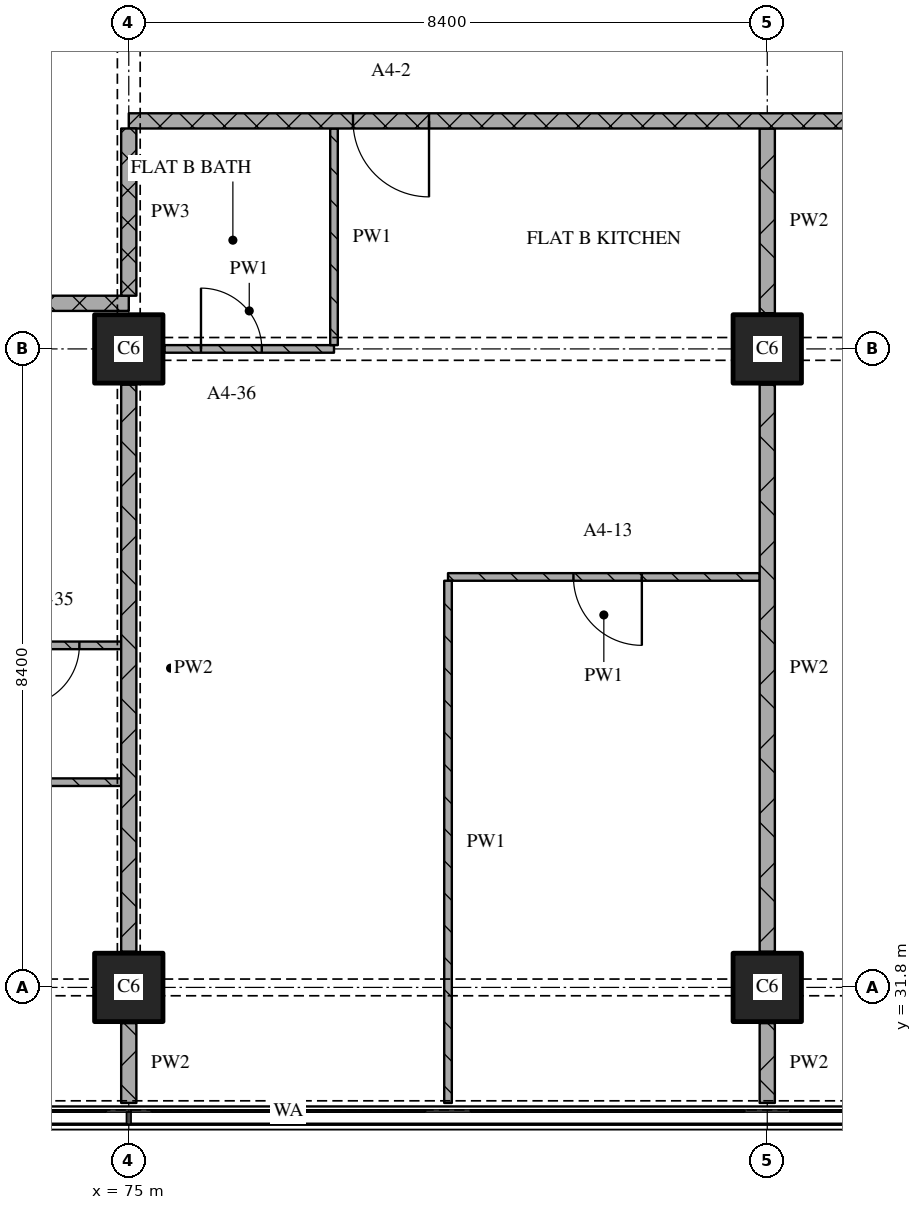
"""IFC4 building model, lengths in metres.
Left out: names, types, materials, properties, quantities, classifications, styles, units other than length and angle.
Written with IfcOpenShell. Run it as: python <this file> out.ifc"""

import sys

from ifc_helpers import new_model, si_unit, direction, frame, frame_2d, origin, origin_2d, place, context, subcontext, project, spatial, rectangle, extrude, element, fill, save


model = new_model("IFC4")
c1 = context("Model", 3, precision=1e-05, world=origin(), true_north=direction((0.0, 1.0)))
c2 = subcontext(c1, "Body", "Model", "MODEL_VIEW")
j1 = project(units=[si_unit("LENGTHUNIT", "METRE"), si_unit("PLANEANGLEUNIT", "RADIAN")], contexts=[c1])
p1 = place(None, origin())
s1 = spatial("IfcSite", under=j1, at=p1, CompositionType="ELEMENT")
p2 = place(p1, origin())
s2 = spatial("IfcBuilding", under=s1, at=p2, CompositionType="ELEMENT")
p3 = place(p2, frame((0.0, 0.0, 73.2)))
s3 = spatial("IfcBuildingStorey", under=s2, at=p3, CompositionType="ELEMENT", Elevation=73.2)
for number, where, z_axis, x_axis in (
    (1, (75.0, 31.8, 0.0), (0.0, 0.0, 1.0), (1.0, 0.0, 0.0)),
    (2, (75.0, 40.2, 0.0), (0.0, 0.0, 1.0), (1.0, 0.0, 0.0)),
    (3, (83.4, 31.8, 0.0), (0.0, 0.0, 1.0), (1.0, 0.0, 0.0)),
    (4, (83.4, 40.2, 0.0), (0.0, 0.0, 1.0), (1.0, 0.0, 0.0)),
):
    element("IfcColumn", number, at=place(p3, frame(where, z_axis=z_axis, x_axis=x_axis)), inside=s3, PredefinedType="COLUMN", context=c2, shape_type="SweptSolid", body=[
        extrude(rectangle(XDim=0.9, YDim=0.9, at=origin_2d()), origin(), (0.0, 0.0, 1.0), 3.6),
    ])
p4 = place(p3, frame((74.9, 34.5, 0.0), z_axis=(0.0, 0.0, 1.0), x_axis=(-1.0, 0.0, 0.0)))
e5 = element("IfcWall", 5, at=p4, inside=s3, PredefinedType="PARTITIONING", context=c2, shape_type="SweptSolid", body=[
    extrude(rectangle(XDim=16.7, YDim=0.1, at=frame_2d((8.35, 0.0))), origin(), (0.0, 0.0, 1.0), 3.32),
])
p5 = place(p4, frame((3.65, 0.0, 0.0)))
e6 = element("IfcOpeningElement", 6, at=p5, cuts=e5, PredefinedType="OPENING", context=c2, shape_type="SweptSolid", body=[
    extrude(rectangle(XDim=0.9, YDim=2.1, at=frame_2d((0.45, 1.05))), frame((0.0, 0.06, 0.0), z_axis=(0.0, -1.0, 0.0), x_axis=(1.0, 0.0, 0.0)), (0.0, 0.0, 1.0), 0.12),
])
p6 = place(p4, frame((12.05, 0.0, 0.0)))
e7 = element("IfcOpeningElement", 7, at=p6, cuts=e5, PredefinedType="OPENING", context=c2, shape_type="SweptSolid", body=[
    extrude(rectangle(XDim=0.9, YDim=2.1, at=frame_2d((0.45, 1.05))), frame((0.0, 0.06, 0.0), z_axis=(0.0, -1.0, 0.0), x_axis=(1.0, 0.0, 0.0)), (0.0, 0.0, 1.0), 0.12),
])
p7 = place(p3, frame((68.4, 36.3, 0.0), z_axis=(0.0, 0.0, 1.0), x_axis=(1.0, 0.0, 0.0)))
e8 = element("IfcWall", 8, at=p7, inside=s3, PredefinedType="PARTITIONING", context=c2, shape_type="SweptSolid", body=[
    extrude(rectangle(XDim=6.5, YDim=0.1, at=frame_2d((3.25, 0.0))), origin(), (0.0, 0.0, 1.0), 3.32),
])
p8 = place(p7, frame((5.15, 0.0, 0.0)))
e9 = element("IfcOpeningElement", 9, at=p8, cuts=e8, PredefinedType="OPENING", context=c2, shape_type="SweptSolid", body=[
    extrude(rectangle(XDim=0.8, YDim=2.1, at=frame_2d((0.4, 1.05))), frame((0.0, 0.06, 0.0), z_axis=(0.0, -1.0, 0.0), x_axis=(1.0, 0.0, 0.0)), (0.0, 0.0, 1.0), 0.12),
])
p9 = place(p3, frame((83.3, 37.2, 0.0), z_axis=(0.0, 0.0, 1.0), x_axis=(-1.0, 0.0, 0.0)))
e10 = element("IfcWall", 10, at=p9, inside=s3, PredefinedType="PARTITIONING", context=c2, shape_type="SweptSolid", body=[
    extrude(rectangle(XDim=4.1, YDim=0.1, at=frame_2d((2.05, 0.0))), origin(), (0.0, 0.0, 1.0), 3.32),
])
p10 = place(p9, frame((1.55, 0.0, 0.0)))
e11 = element("IfcOpeningElement", 11, at=p10, cuts=e10, PredefinedType="OPENING", context=c2, shape_type="SweptSolid", body=[
    extrude(rectangle(XDim=0.9, YDim=2.1, at=frame_2d((0.45, 1.05))), frame((0.0, 0.06, 0.0), z_axis=(0.0, -1.0, 0.0), x_axis=(1.0, 0.0, 0.0)), (0.0, 0.0, 1.0), 0.12),
])
p11 = place(p3, frame((75.47, 40.2, 0.0), z_axis=(0.0, 0.0, 1.0), x_axis=(1.0, 0.0, 0.0)))
e12 = element("IfcWall", 12, at=p11, inside=s3, PredefinedType="PARTITIONING", context=c2, shape_type="SweptSolid", body=[
    extrude(rectangle(XDim=2.23, YDim=0.1, at=frame_2d((1.115, 0.0))), origin(), (0.0, 0.0, 1.0), 2.83),
])
p12 = place(p11, frame((0.48, 0.0, 0.0)))
e13 = element("IfcOpeningElement", 13, at=p12, cuts=e12, PredefinedType="OPENING", context=c2, shape_type="SweptSolid", body=[
    extrude(rectangle(XDim=0.8, YDim=2.1, at=frame_2d((0.4, 1.05))), frame((0.0, 0.06, 0.0), z_axis=(0.0, -1.0, 0.0), x_axis=(1.0, 0.0, 0.0)), (0.0, 0.0, 1.0), 0.12),
])
p13 = place(p3, frame((75.0, 40.8, 0.0), z_axis=(0.0, 0.0, 1.0), x_axis=(-1.0, 0.0, 0.0)))
e14 = element("IfcWall", 14, at=p13, inside=s3, PredefinedType="PARTITIONING", context=c2, shape_type="SweptSolid", body=[
    extrude(rectangle(XDim=24.08, YDim=0.2, at=frame_2d((12.04, 0.0))), origin(), (0.0, 0.0, 1.0), 3.32),
])
p14 = place(p13, frame((6.85, 0.0, 0.0)))
e15 = element("IfcOpeningElement", 15, at=p14, cuts=e14, PredefinedType="OPENING", context=c2, shape_type="SweptSolid", body=[
    extrude(rectangle(XDim=1.0, YDim=2.1, at=frame_2d((0.5, 1.05))), frame((0.0, 0.11, 0.0), z_axis=(0.0, -1.0, 0.0), x_axis=(1.0, 0.0, 0.0)), (0.0, 0.0, 1.0), 0.22),
])
p15 = place(p3, frame((100.2, 43.2, 0.0), z_axis=(0.0, 0.0, 1.0), x_axis=(-1.0, 0.0, 0.0)))
e16 = element("IfcWall", 16, at=p15, inside=s3, PredefinedType="PARTITIONING", context=c2, shape_type="SweptSolid", body=[
    extrude(rectangle(XDim=25.2, YDim=0.2, at=frame_2d((12.6, 0.0))), origin(), (0.0, 0.0, 1.0), 3.32),
])
p16 = place(p15, frame((5.95, 0.0, 0.0)))
e17 = element("IfcOpeningElement", 17, at=p16, cuts=e16, PredefinedType="OPENING", context=c2, shape_type="SweptSolid", body=[
    extrude(rectangle(XDim=1.0, YDim=2.1, at=frame_2d((0.5, 1.05))), frame((0.0, 0.11, 0.0), z_axis=(0.0, -1.0, 0.0), x_axis=(1.0, 0.0, 0.0)), (0.0, 0.0, 1.0), 0.22),
])
p17 = place(p15, frame((21.25, 0.0, 0.0)))
e18 = element("IfcOpeningElement", 18, at=p17, cuts=e16, PredefinedType="OPENING", context=c2, shape_type="SweptSolid", body=[
    extrude(rectangle(XDim=1.0, YDim=2.1, at=frame_2d((0.5, 1.05))), frame((0.0, 0.11, 0.0), z_axis=(0.0, -1.0, 0.0), x_axis=(1.0, 0.0, 0.0)), (0.0, 0.0, 1.0), 0.22),
])
p18 = place(p3, frame((75.0, 43.1, 0.0), z_axis=(0.0, 0.0, 1.0), x_axis=(0.0, -1.0, 0.0)))
e19 = element("IfcWall", 19, at=p18, inside=s3, PredefinedType="PARTITIONING", context=c2, shape_type="SweptSolid", body=[
    extrude(rectangle(XDim=2.2, YDim=0.2, at=frame_2d((1.1, 0.0))), origin(), (0.0, 0.0, 1.0), 2.43),
])
p19 = place(p3, frame((75.0, 31.33, 0.0), z_axis=(0.0, 0.0, 1.0), x_axis=(0.0, -1.0, 0.0)))
e20 = element("IfcWall", 20, at=p19, inside=s3, PredefinedType="PARTITIONING", context=c2, shape_type="SweptSolid", body=[
    extrude(rectangle(XDim=1.05, YDim=0.2, at=frame_2d((0.525, 0.0))), origin(), (0.0, 0.0, 1.0), 3.32),
])
p20 = place(p3, frame((75.0, 39.73, 0.0), z_axis=(0.0, 0.0, 1.0), x_axis=(0.0, -1.0, 0.0)))
e21 = element("IfcWall", 21, at=p20, inside=s3, PredefinedType="PARTITIONING", context=c2, shape_type="SweptSolid", body=[
    extrude(rectangle(XDim=7.46, YDim=0.2, at=frame_2d((3.73, 0.0))), origin(), (0.0, 0.0, 1.0), 2.83),
])
p21 = place(p3, frame((77.7, 43.1, 0.0), z_axis=(0.0, 0.0, 1.0), x_axis=(0.0, -1.0, 0.0)))
e22 = element("IfcWall", 22, at=p21, inside=s3, PredefinedType="PARTITIONING", context=c2, shape_type="SweptSolid", body=[
    extrude(rectangle(XDim=2.85, YDim=0.1, at=frame_2d((1.425, 0.0))), origin(), (0.0, 0.0, 1.0), 3.32),
])
p22 = place(p3, frame((79.2, 37.15, 0.0), z_axis=(0.0, 0.0, 1.0), x_axis=(0.0, -1.0, 0.0)))
e23 = element("IfcWall", 23, at=p22, inside=s3, PredefinedType="PARTITIONING", context=c2, shape_type="SweptSolid", body=[
    extrude(rectangle(XDim=6.87, YDim=0.1, at=frame_2d((3.435, 0.0))), origin(), (0.0, 0.0, 1.0), 3.32),
])
p23 = place(p3, frame((83.4, 31.33, 0.0), z_axis=(0.0, 0.0, 1.0), x_axis=(0.0, -1.0, 0.0)))
e24 = element("IfcWall", 24, at=p23, inside=s3, PredefinedType="PARTITIONING", context=c2, shape_type="SweptSolid", body=[
    extrude(rectangle(XDim=1.05, YDim=0.2, at=frame_2d((0.525, 0.0))), origin(), (0.0, 0.0, 1.0), 3.32),
])
p24 = place(p3, frame((83.4, 39.73, 0.0), z_axis=(0.0, 0.0, 1.0), x_axis=(0.0, -1.0, 0.0)))
e25 = element("IfcWall", 25, at=p24, inside=s3, PredefinedType="PARTITIONING", context=c2, shape_type="SweptSolid", body=[
    extrude(rectangle(XDim=7.46, YDim=0.2, at=frame_2d((3.73, 0.0))), origin(), (0.0, 0.0, 1.0), 3.32),
])
p25 = place(p3, frame((83.4, 43.1, 0.0), z_axis=(0.0, 0.0, 1.0), x_axis=(0.0, -1.0, 0.0)))
e26 = element("IfcWall", 26, at=p25, inside=s3, PredefinedType="PARTITIONING", context=c2, shape_type="SweptSolid", body=[
    extrude(rectangle(XDim=2.43, YDim=0.2, at=frame_2d((1.215, 0.0))), origin(), (0.0, 0.0, 1.0), 3.32),
])
p26 = place(p8, origin())
e27 = element("IfcDoor", 27, at=p26, inside=s3, OperationType="SINGLE_SWING_RIGHT", PredefinedType="DOOR", context=c2, shape_type="SweptSolid", body=[
    extrude(rectangle(XDim=0.8, YDim=2.1, at=frame_2d((0.4, 1.05))), frame((0.0, 0.025, 0.0), z_axis=(0.0, -1.0, 0.0), x_axis=(1.0, 0.0, 0.0)), (0.0, 0.0, 1.0), 0.05),
])
fill(e9, e27)
p27 = place(p10, origin())
e28 = element("IfcDoor", 28, at=p27, inside=s3, OperationType="SINGLE_SWING_LEFT", PredefinedType="DOOR", context=c2, shape_type="SweptSolid", body=[
    extrude(rectangle(XDim=0.9, YDim=2.1, at=frame_2d((0.45, 1.05))), frame((0.0, 0.025, 0.0), z_axis=(0.0, -1.0, 0.0), x_axis=(1.0, 0.0, 0.0)), (0.0, 0.0, 1.0), 0.05),
])
fill(e11, e28)
p28 = place(p12, origin())
e29 = element("IfcDoor", 29, at=p28, inside=s3, OperationType="SINGLE_SWING_LEFT", PredefinedType="DOOR", context=c2, shape_type="SweptSolid", body=[
    extrude(rectangle(XDim=0.8, YDim=2.1, at=frame_2d((0.4, 1.05))), frame((0.0, 0.025, 0.0), z_axis=(0.0, -1.0, 0.0), x_axis=(1.0, 0.0, 0.0)), (0.0, 0.0, 1.0), 0.05),
])
fill(e13, e29)
p29 = place(p17, origin())
e30 = element("IfcDoor", 30, at=p29, inside=s3, OperationType="SINGLE_SWING_LEFT", PredefinedType="DOOR", context=c2, shape_type="SweptSolid", body=[
    extrude(rectangle(XDim=1.0, YDim=2.1, at=frame_2d((0.5, 1.05))), frame((0.0, 0.025, 0.0), z_axis=(0.0, -1.0, 0.0), x_axis=(1.0, 0.0, 0.0)), (0.0, 0.0, 1.0), 0.05),
])
fill(e18, e30)
save(model, sys.argv[1])
